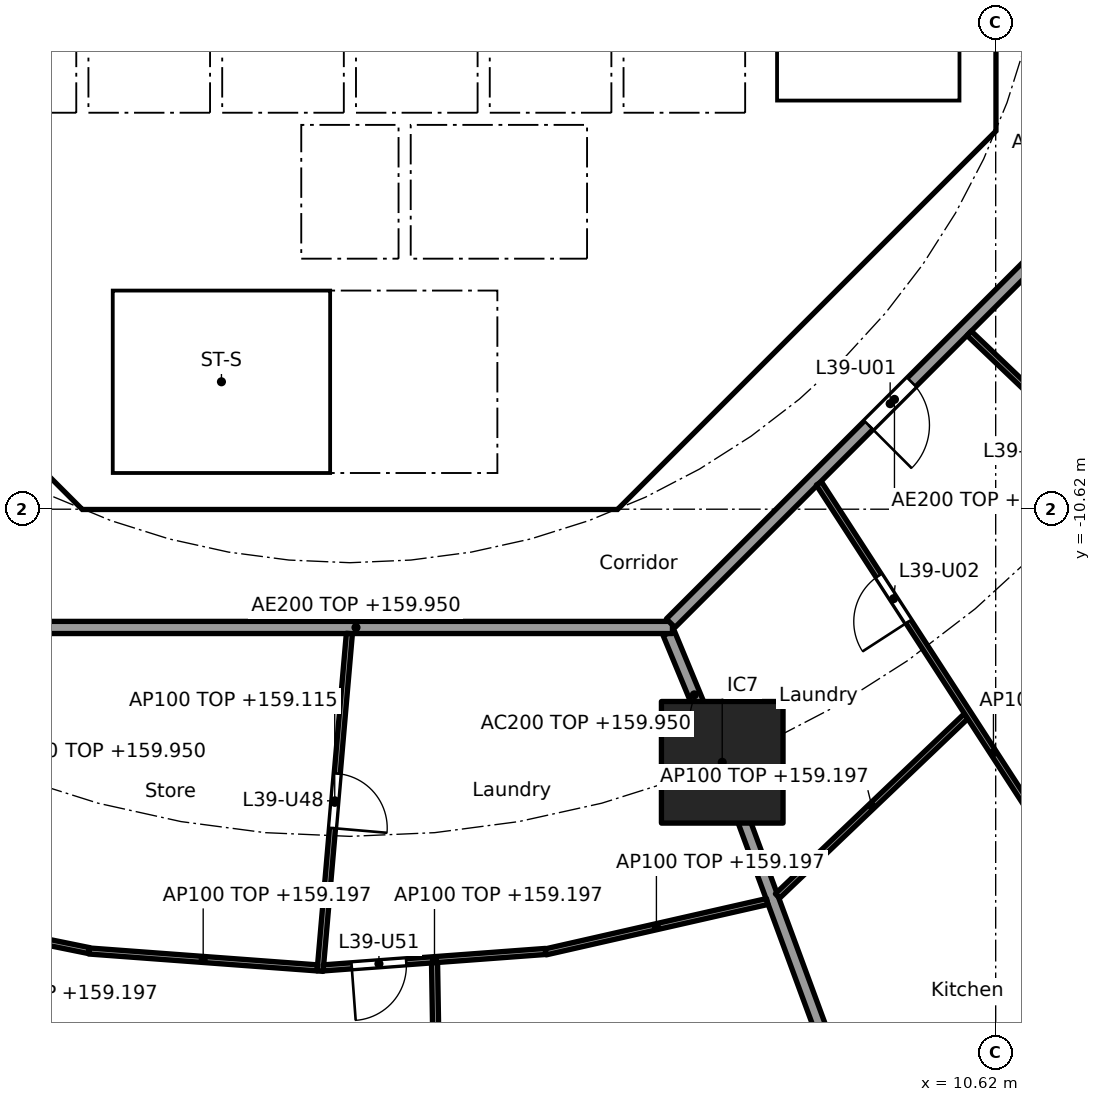
"""IFC4 building model, lengths in metres.
Left out: names, types, materials, properties, quantities, classifications, styles, units other than length and angle.
Written with IfcOpenShell. Run it as: python <this file> out.ifc"""

import sys

from ifc_helpers import new_model, si_unit, direction, frame, frame_2d, origin, origin_2d, place, context, subcontext, project, spatial, polyline, rectangle, outline, extrude, element, fill, save


model = new_model("IFC4")
c1 = context("Model", 3, precision=1e-05, world=origin(), true_north=direction((0.0, 1.0)))
c2 = subcontext(c1, "Body", "Model", "MODEL_VIEW")
j1 = project(units=[si_unit("LENGTHUNIT", "METRE"), si_unit("PLANEANGLEUNIT", "RADIAN")], contexts=[c1])
p1 = place(None, origin())
s1 = spatial("IfcSite", under=j1, at=p1, CompositionType="ELEMENT")
p2 = place(p1, origin())
s2 = spatial("IfcBuilding", under=s1, at=p2, CompositionType="ELEMENT")
p3 = place(p2, frame((0.0, 0.0, 156.6)))
s3 = spatial("IfcBuildingStorey", under=s2, at=p3, CompositionType="ELEMENT", Elevation=156.6)
p4 = place(p3, frame((6.123, -14.782, 0.0), z_axis=(0.0, 0.0, 1.0), x_axis=(1.0, 0.0, 0.0)))
e1 = element("IfcColumn", 1, at=p4, inside=s3, PredefinedType="COLUMN", context=c2, shape_type="SweptSolid", body=[
    extrude(rectangle(XDim=2.0, YDim=2.0, at=origin_2d()), origin(), (0.0, 0.0, 1.0), 3.7),
])
p5 = place(p3, frame((-9.988, -4.613, 0.0), z_axis=(0.0, 0.0, 1.0), x_axis=(0.707106781187, -0.707106781187, 0.0)))
e2 = element("IfcWall", 2, at=p5, inside=s3, PredefinedType="SHEAR", context=c2, shape_type="SweptSolid", body=[
    extrude(rectangle(XDim=7.602, YDim=0.6, at=frame_2d((3.801, 0.0))), origin(), (0.0, 0.0, 1.0), 3.35),
])
p6 = place(p5, frame((6.151, 0.0, 0.0)))
e3 = element("IfcOpeningElement", 3, at=p6, cuts=e2, PredefinedType="OPENING", context=c2, shape_type="SweptSolid", body=[
    extrude(rectangle(XDim=1.1, YDim=2.1, at=frame_2d((0.55, 1.05))), frame((0.0, 0.31, 0.0), z_axis=(0.0, -1.0, 0.0), x_axis=(1.0, 0.0, 0.0)), (0.0, 0.0, 1.0), 0.62),
])
p7 = place(p3, frame((4.613, -9.988, 0.0), z_axis=(0.0, 0.0, 1.0), x_axis=(0.707106781187, 0.707106781187, 0.0)))
e4 = element("IfcWall", 4, at=p7, inside=s3, PredefinedType="SHEAR", context=c2, shape_type="SweptSolid", body=[
    extrude(rectangle(XDim=7.602, YDim=0.6, at=frame_2d((3.801, 0.0))), origin(), (0.0, 0.0, 1.0), 3.35),
])
p8 = place(p7, frame((3.201, 0.0, 0.0)))
e5 = element("IfcOpeningElement", 5, at=p8, cuts=e4, PredefinedType="OPENING", context=c2, shape_type="SweptSolid", body=[
    extrude(rectangle(XDim=1.2, YDim=2.1, at=frame_2d((0.6, 1.05))), frame((0.0, 0.31, 0.0), z_axis=(0.0, -1.0, 0.0), x_axis=(1.0, 0.0, 0.0)), (0.0, 0.0, 1.0), 0.62),
])
p9 = place(p3, frame((4.0, -10.025, 0.0), z_axis=(0.0, 0.0, 1.0), x_axis=(0.0, 1.0, 0.0)))
e6 = element("IfcWall", 6, at=p9, inside=s3, PredefinedType="SOLIDWALL", context=c2, shape_type="SweptSolid", body=[
    extrude(rectangle(XDim=3.0, YDim=0.2, at=frame_2d((1.5, 0.0))), origin(), (0.0, 0.0, 1.0), 3.35),
])
p10 = place(p9, frame((0.975, 0.0, 0.0)))
e7 = element("IfcOpeningElement", 7, at=p10, cuts=e6, PredefinedType="OPENING", context=c2, shape_type="SweptSolid", body=[
    extrude(rectangle(XDim=1.1, YDim=2.1, at=frame_2d((0.55, 1.05))), frame((0.0, 0.11, 0.0), z_axis=(0.0, -1.0, 0.0), x_axis=(1.0, 0.0, 0.0)), (0.0, 0.0, 1.0), 0.22),
])
p11 = place(p3, frame((4.0, -6.5, 0.0), z_axis=(0.0, 0.0, 1.0), x_axis=(0.0, 1.0, 0.0)))
e8 = element("IfcWall", 8, at=p11, inside=s3, PredefinedType="SOLIDWALL", context=c2, shape_type="SweptSolid", body=[
    extrude(rectangle(XDim=2.2, YDim=0.2, at=frame_2d((1.1, 0.0))), origin(), (0.0, 0.0, 1.0), 3.35),
])
p12 = place(p11, frame((0.55, 0.0, 0.0)))
e9 = element("IfcOpeningElement", 9, at=p12, cuts=e8, PredefinedType="OPENING", context=c2, shape_type="SweptSolid", body=[
    extrude(rectangle(XDim=1.1, YDim=2.1, at=frame_2d((0.55, 1.05))), frame((0.0, 0.11, 0.0), z_axis=(0.0, -1.0, 0.0), x_axis=(1.0, 0.0, 0.0)), (0.0, 0.0, 1.0), 0.22),
])
p13 = place(p3, frame((-4.0, -6.5, 0.0), z_axis=(0.0, 0.0, 1.0), x_axis=(0.0, 1.0, 0.0)))
e10 = element("IfcWall", 10, at=p13, inside=s3, PredefinedType="SOLIDWALL", context=c2, shape_type="SweptSolid", body=[
    extrude(rectangle(XDim=2.2, YDim=0.2, at=frame_2d((1.1, 0.0))), origin(), (0.0, 0.0, 1.0), 3.35),
])
p14 = place(p13, frame((0.65, 0.0, 0.0)))
e11 = element("IfcOpeningElement", 11, at=p14, cuts=e10, PredefinedType="OPENING", context=c2, shape_type="SweptSolid", body=[
    extrude(rectangle(XDim=0.9, YDim=2.1, at=frame_2d((0.45, 1.05))), frame((0.0, 0.11, 0.0), z_axis=(0.0, -1.0, 0.0), x_axis=(1.0, 0.0, 0.0)), (0.0, 0.0, 1.0), 0.22),
])
p15 = place(p3, origin())
e12 = element("IfcWall", 12, at=p15, inside=s3, PredefinedType="SHEAR", context=c2, shape_type="SweptSolid", body=[
    extrude(outline(polyline([(-4.152, -10.025), (4.152, -10.025), (4.401, -9.776), (4.825, -10.2), (4.401, -10.625), (-4.401, -10.625), (-4.825, -10.2), (-4.401, -9.776), (-4.152, -10.025)])), origin(), (0.0, 0.0, 1.0), 3.35),
])
p16 = place(p3, origin())
e13 = element("IfcWall", 13, at=p16, inside=s3, PredefinedType="SHEAR", context=c2, shape_type="SweptSolid", body=[
    extrude(outline(polyline([(9.776, -4.401), (10.025, -4.152), (10.025, -3.801), (10.025, 4.152), (9.776, 4.401), (10.2, 4.825), (10.625, 4.401), (10.625, -4.401), (10.2, -4.825), (9.776, -4.401)])), origin(), (0.0, 0.0, 1.0), 3.35),
])
for number, where, z_axis, x_axis in (
    (14, (-0.9, -6.5, 0.0), (0.0, 0.0, 1.0), (0.0, 1.0, 0.0)),
    (15, (0.9, -6.5, 0.0), (0.0, 0.0, 1.0), (0.0, 1.0, 0.0)),
):
    element("IfcWall", number, at=place(p3, frame(where, z_axis=z_axis, x_axis=x_axis)), inside=s3, PredefinedType="SOLIDWALL", context=c2, shape_type="SweptSolid", body=[
        extrude(rectangle(XDim=2.2, YDim=0.2, at=frame_2d((1.1, 0.0))), origin(), (0.0, 0.0, 1.0), 3.35),
    ])
p17 = place(p3, origin())
e16 = element("IfcWall", 16, at=p17, inside=s3, PredefinedType="SOLIDWALL", context=c2, shape_type="SweptSolid", body=[
    extrude(outline(polyline([(-6.7, -2.1), (-6.5, -2.1), (-6.5, -4.1), (-4.5, -4.1), (-4.5, -2.1), (-4.3, -2.1), (-4.3, -4.1), (-2.3, -4.1), (-2.3, -2.1), (-2.1, -2.1), (-2.1, -4.1), (-0.1, -4.1), (-0.1, -2.1), (0.1, -2.1), (0.1, -4.1), (2.1, -4.1), (2.1, -2.1), (2.3, -2.1), (2.3, -4.1), (4.3, -4.1), (4.3, -2.1), (4.5, -2.1), (4.5, -4.1), (6.5, -4.1), (6.5, -2.1), (6.7, -2.1), (6.7, -4.3), (-6.7, -4.3), (-6.7, -2.1)])), origin(), (0.0, 0.0, 1.0), 3.35),
])
p18 = place(p3, origin())
e17 = element("IfcWall", 17, at=p18, inside=s3, PredefinedType="SOLIDWALL", context=c2, shape_type="SweptSolid", body=[
    extrude(outline(polyline([(-3.9, -10.025), (-4.1, -10.025), (-4.1, -7.025), (-3.9, -7.025), (-3.9, -10.025)])), origin(), (0.0, 0.0, 1.0), 3.35),
])
p19 = place(p3, origin())
e18 = element("IfcWall", 18, at=p19, inside=s3, PredefinedType="SOLIDWALL", context=c2, shape_type="SweptSolid", body=[
    extrude(outline(polyline([(4.1, -7.025), (-4.1, -7.025), (-4.1, -6.5), (4.1, -6.5), (4.1, -7.025)])), origin(), (0.0, 0.0, 1.0), 3.35),
])
p20 = place(p3, origin())
e19 = element("IfcWall", 19, at=p20, inside=s3, PredefinedType="SOLIDWALL", context=c2, shape_type="SweptSolid", body=[
    extrude(outline(polyline([(7.025, -3.9), (6.7, -3.9), (6.7, 3.9), (7.025, 3.9), (7.025, -3.9)])), origin(), (0.0, 0.0, 1.0), 3.35),
])
p21 = place(p3, origin())
e20 = element("IfcWall", 20, at=p21, inside=s3, PredefinedType="SOLIDWALL", context=c2, shape_type="SweptSolid", body=[
    extrude(outline(polyline([(10.025, -4.1), (6.7, -4.1), (6.7, -3.9), (10.025, -3.9), (10.025, -4.1)])), origin(), (0.0, 0.0, 1.0), 3.35),
])
p22 = place(p3, frame((5.243, -12.657, 0.0), z_axis=(0.0, 0.0, 1.0), x_axis=(0.38273085373, -0.923859888513, 0.0)))
e21 = element("IfcWall", 21, at=p22, inside=s3, PredefinedType="PARTITIONING", context=c2, shape_type="SweptSolid", body=[
    extrude(rectangle(XDim=2.199, YDim=0.2, at=frame_2d((1.1, 0.0))), origin(), (0.0, 0.0, 1.0), 3.35),
])
p23 = place(p3, frame((6.14, -14.829, 0.0), z_axis=(0.0, 0.0, 1.0), x_axis=(0.346169582481, -0.938171956608, 0.0)))
e22 = element("IfcWall", 22, at=p23, inside=s3, PredefinedType="PARTITIONING", context=c2, shape_type="SweptSolid", body=[
    extrude(rectangle(XDim=14.354, YDim=0.2, at=frame_2d((7.177, 0.0))), origin(), (0.0, 0.0, 1.0), 2.597),
])
p24 = place(p3, frame((-5.104, -12.565, 0.0), z_axis=(0.0, 0.0, 1.0), x_axis=(1.0, 0.0, 0.0)))
e23 = element("IfcWall", 23, at=p24, inside=s3, PredefinedType="PARTITIONING", context=c2, shape_type="SweptSolid", body=[
    extrude(rectangle(XDim=10.409, YDim=0.2, at=frame_2d((5.205, 0.0))), origin(), (0.0, 0.0, 1.0), 3.35),
])
p25 = place(p3, frame((5.275, -12.494, 0.0), z_axis=(0.0, 0.0, 1.0), x_axis=(0.707106781187, 0.707106781187, 0.0)))
e24 = element("IfcWall", 24, at=p25, inside=s3, PredefinedType="PARTITIONING", context=c2, shape_type="SweptSolid", body=[
    extrude(rectangle(XDim=10.409, YDim=0.2, at=frame_2d((5.205, 0.0))), origin(), (0.0, 0.0, 1.0), 3.35),
])
p26 = place(p25, frame((4.604, 0.0, 0.0)))
e25 = element("IfcOpeningElement", 25, at=p26, cuts=e24, PredefinedType="OPENING", context=c2, shape_type="SweptSolid", body=[
    extrude(rectangle(XDim=1.0, YDim=2.1, at=frame_2d((0.5, 1.05))), frame((0.0, 0.11, 0.0), z_axis=(0.0, -1.0, 0.0), x_axis=(1.0, 0.0, 0.0)), (0.0, 0.0, 1.0), 0.22),
])
p27 = place(p3, frame((-7.568, -17.212, 0.0), z_axis=(0.0, 0.0, 1.0), x_axis=(0.979967079473, -0.199159541946, 0.0)))
e26 = element("IfcWall", 26, at=p27, inside=s3, PredefinedType="PARTITIONING", context=c2, shape_type="SweptSolid", body=[
    extrude(rectangle(XDim=3.347, YDim=0.1, at=frame_2d((1.673, 0.0))), origin(), (0.0, 0.0, 1.0), 2.597),
])
p28 = place(p3, frame((-4.29, -17.885, 0.0), z_axis=(0.0, 0.0, 1.0), x_axis=(0.997272353708, -0.073809569363, 0.0)))
e27 = element("IfcWall", 27, at=p28, inside=s3, PredefinedType="PARTITIONING", context=c2, shape_type="SweptSolid", body=[
    extrude(rectangle(XDim=3.764, YDim=0.1, at=frame_2d((1.882, 0.0))), origin(), (0.0, 0.0, 1.0), 2.597),
])
p29 = place(p3, frame((-0.009, -12.664, 0.0), z_axis=(0.0, 0.0, 1.0), x_axis=(-0.086431127211, -0.9962578282, 0.0)))
e28 = element("IfcWall", 28, at=p29, inside=s3, PredefinedType="PARTITIONING", context=c2, shape_type="SweptSolid", body=[
    extrude(rectangle(XDim=5.573, YDim=0.1, at=frame_2d((2.787, 0.0))), origin(), (0.0, 0.0, 1.0), 2.515),
])
p30 = place(p29, frame((2.312, 0.0, 0.0)))
e29 = element("IfcOpeningElement", 29, at=p30, cuts=e28, PredefinedType="OPENING", context=c2, shape_type="SweptSolid", body=[
    extrude(rectangle(XDim=0.9, YDim=2.1, at=frame_2d((0.45, 1.05))), frame((0.0, 0.06, 0.0), z_axis=(0.0, -1.0, 0.0), x_axis=(1.0, 0.0, 0.0)), (0.0, 0.0, 1.0), 0.12),
])
p31 = place(p3, frame((-0.436, -18.163, 0.0), z_axis=(0.0, 0.0, 1.0), x_axis=(0.997271025958, 0.073827506966, 0.0)))
e30 = element("IfcWall", 30, at=p31, inside=s3, PredefinedType="PARTITIONING", context=c2, shape_type="SweptSolid", body=[
    extrude(rectangle(XDim=3.664, YDim=0.1, at=frame_2d((1.832, 0.0))), origin(), (0.0, 0.0, 1.0), 2.597),
])
p32 = place(p31, frame((0.466, 0.0, 0.0)))
e31 = element("IfcOpeningElement", 31, at=p32, cuts=e30, PredefinedType="OPENING", context=c2, shape_type="SweptSolid", body=[
    extrude(rectangle(XDim=0.9, YDim=2.1, at=frame_2d((0.45, 1.05))), frame((0.0, 0.06, 0.0), z_axis=(0.0, -1.0, 0.0), x_axis=(1.0, 0.0, 0.0)), (0.0, 0.0, 1.0), 0.12),
])
p33 = place(p3, frame((1.392, -18.078, 0.0), z_axis=(0.0, 0.0, 1.0), x_axis=(0.016433071124, -0.99986496797, 0.0)))
e32 = element("IfcWall", 32, at=p33, inside=s3, PredefinedType="PARTITIONING", context=c2, shape_type="SweptSolid", body=[
    extrude(rectangle(XDim=6.983, YDim=0.1, at=frame_2d((3.491, 0.0))), origin(), (0.0, 0.0, 1.0), 3.35),
])
p34 = place(p33, frame((3.041, 0.0, 0.0)))
e33 = element("IfcOpeningElement", 33, at=p34, cuts=e32, PredefinedType="OPENING", context=c2, shape_type="SweptSolid", body=[
    extrude(rectangle(XDim=0.9, YDim=2.1, at=frame_2d((0.45, 1.05))), frame((0.0, 0.06, 0.0), z_axis=(0.0, -1.0, 0.0), x_axis=(1.0, 0.0, 0.0)), (0.0, 0.0, 1.0), 0.12),
])
p35 = place(p3, frame((3.219, -17.9, 0.0), z_axis=(0.0, 0.0, 1.0), x_axis=(0.975106528652, 0.22173691118, 0.0)))
e34 = element("IfcWall", 34, at=p35, inside=s3, PredefinedType="PARTITIONING", context=c2, shape_type="SweptSolid", body=[
    extrude(rectangle(XDim=3.736, YDim=0.1, at=frame_2d((1.868, 0.0))), origin(), (0.0, 0.0, 1.0), 2.597),
])
p36 = place(p3, frame((7.032, -16.98, 0.0), z_axis=(0.0, 0.0, 1.0), x_axis=(0.723709759148, 0.690104473622, 0.0)))
e35 = element("IfcWall", 35, at=p36, inside=s3, PredefinedType="PARTITIONING", context=c2, shape_type="SweptSolid", body=[
    extrude(rectangle(XDim=4.286, YDim=0.1, at=frame_2d((2.143, 0.0))), origin(), (0.0, 0.0, 1.0), 2.597),
])
p37 = place(p3, frame((9.195, -22.84, 0.0), z_axis=(0.0, 0.0, 1.0), x_axis=(0.741675855479, 0.670758470241, 0.0)))
e36 = element("IfcWall", 36, at=p37, inside=s3, PredefinedType="PARTITIONING", context=c2, shape_type="SweptSolid", body=[
    extrude(rectangle(XDim=5.656, YDim=0.1, at=frame_2d((2.828, 0.0))), origin(), (0.0, 0.0, 1.0), 2.597),
])
p38 = place(p3, frame((7.712, -10.195, 0.0), z_axis=(0.0, 0.0, 1.0), x_axis=(0.543868615753, -0.839170381269, 0.0)))
e37 = element("IfcWall", 37, at=p38, inside=s3, PredefinedType="PARTITIONING", context=c2, shape_type="SweptSolid", body=[
    extrude(rectangle(XDim=10.558, YDim=0.1, at=frame_2d((5.279, 0.0))), origin(), (0.0, 0.0, 1.0), 2.515),
])
p39 = place(p38, frame((1.81, 0.0, 0.0)))
e38 = element("IfcOpeningElement", 38, at=p39, cuts=e37, PredefinedType="OPENING", context=c2, shape_type="SweptSolid", body=[
    extrude(rectangle(XDim=0.9, YDim=2.1, at=frame_2d((0.45, 1.05))), frame((0.0, 0.06, 0.0), z_axis=(0.0, -1.0, 0.0), x_axis=(1.0, 0.0, 0.0)), (0.0, 0.0, 1.0), 0.12),
])
p40 = place(p38, frame((7.064, 0.0, 0.0)))
e39 = element("IfcOpeningElement", 39, at=p40, cuts=e37, PredefinedType="OPENING", context=c2, shape_type="SweptSolid", body=[
    extrude(rectangle(XDim=0.9, YDim=2.1, at=frame_2d((0.45, 1.05))), frame((0.0, 0.06, 0.0), z_axis=(0.0, -1.0, 0.0), x_axis=(1.0, 0.0, 0.0)), (0.0, 0.0, 1.0), 0.12),
])
p41 = place(p3, frame((10.184, -7.727, 0.0), z_axis=(0.0, 0.0, 1.0), x_axis=(0.723635100101, -0.690182759783, 0.0)))
e40 = element("IfcWall", 40, at=p41, inside=s3, PredefinedType="PARTITIONING", context=c2, shape_type="SweptSolid", body=[
    extrude(rectangle(XDim=14.173, YDim=0.1, at=frame_2d((7.086, 0.0))), origin(), (0.0, 0.0, 1.0), 2.515),
])
p42 = place(p41, frame((1.565, 0.0, 0.0)))
e41 = element("IfcOpeningElement", 41, at=p42, cuts=e40, PredefinedType="OPENING", context=c2, shape_type="SweptSolid", body=[
    extrude(rectangle(XDim=0.9, YDim=2.1, at=frame_2d((0.45, 1.05))), frame((0.0, 0.06, 0.0), z_axis=(0.0, -1.0, 0.0), x_axis=(1.0, 0.0, 0.0)), (0.0, 0.0, 1.0), 0.12),
])
p43 = place(p41, frame((6.257, 0.0, 0.0)))
e42 = element("IfcOpeningElement", 42, at=p43, cuts=e40, PredefinedType="OPENING", context=c2, shape_type="SweptSolid", body=[
    extrude(rectangle(XDim=0.9, YDim=2.1, at=frame_2d((0.45, 1.05))), frame((0.0, 0.06, 0.0), z_axis=(0.0, -1.0, 0.0), x_axis=(1.0, 0.0, 0.0)), (0.0, 0.0, 1.0), 0.12),
])
p44 = place(p41, frame((11.328, 0.0, 0.0)))
e43 = element("IfcOpeningElement", 43, at=p44, cuts=e40, PredefinedType="OPENING", context=c2, shape_type="SweptSolid", body=[
    extrude(rectangle(XDim=0.9, YDim=2.1, at=frame_2d((0.45, 1.05))), frame((0.0, 0.06, 0.0), z_axis=(0.0, -1.0, 0.0), x_axis=(1.0, 0.0, 0.0)), (0.0, 0.0, 1.0), 0.12),
])
p45 = place(p12, origin())
e44 = element("IfcDoor", 44, at=p45, inside=s3, OperationType="DOUBLE_DOOR_SLIDING", PredefinedType="DOOR", context=c2, shape_type="SweptSolid", body=[
    extrude(rectangle(XDim=1.1, YDim=2.1, at=frame_2d((0.55, 1.05))), frame((0.0, 0.025, 0.0), z_axis=(0.0, -1.0, 0.0), x_axis=(1.0, 0.0, 0.0)), (0.0, 0.0, 1.0), 0.05),
])
fill(e9, e44)
p46 = place(p10, origin())
e45 = element("IfcDoor", 45, at=p46, inside=s3, OperationType="SINGLE_SWING_LEFT", PredefinedType="DOOR", context=c2, shape_type="SweptSolid", body=[
    extrude(rectangle(XDim=1.1, YDim=2.1, at=frame_2d((0.55, 1.05))), frame((0.0, 0.025, 0.0), z_axis=(0.0, -1.0, 0.0), x_axis=(1.0, 0.0, 0.0)), (0.0, 0.0, 1.0), 0.05),
])
fill(e7, e45)
p47 = place(p14, frame((0.9, 0.0, 0.0), x_axis=(-1.0, 0.0, 0.0)))
e46 = element("IfcDoor", 46, at=p47, inside=s3, OperationType="SINGLE_SWING_RIGHT", PredefinedType="DOOR", context=c2, shape_type="SweptSolid", body=[
    extrude(rectangle(XDim=0.9, YDim=2.1, at=frame_2d((0.45, 1.05))), frame((0.0, 0.025, 0.0), z_axis=(0.0, -1.0, 0.0), x_axis=(1.0, 0.0, 0.0)), (0.0, 0.0, 1.0), 0.05),
])
fill(e11, e46)
p48 = place(p8, origin())
e47 = element("IfcDoor", 47, at=p48, inside=s3, OperationType="SINGLE_SWING_LEFT", PredefinedType="DOOR", context=c2, shape_type="SweptSolid", body=[
    extrude(rectangle(XDim=1.2, YDim=2.1, at=frame_2d((0.6, 1.05))), frame((0.0, 0.025, 0.0), z_axis=(0.0, -1.0, 0.0), x_axis=(1.0, 0.0, 0.0)), (0.0, 0.0, 1.0), 0.05),
])
fill(e5, e47)
p49 = place(p6, origin())
e48 = element("IfcDoor", 48, at=p49, inside=s3, OperationType="SINGLE_SWING_LEFT", PredefinedType="DOOR", context=c2, shape_type="SweptSolid", body=[
    extrude(rectangle(XDim=1.1, YDim=2.1, at=frame_2d((0.55, 1.05))), frame((0.0, 0.025, 0.0), z_axis=(0.0, -1.0, 0.0), x_axis=(1.0, 0.0, 0.0)), (0.0, 0.0, 1.0), 0.05),
])
fill(e3, e48)
p50 = place(p26, frame((1.0, 0.0, 0.0), x_axis=(-1.0, 0.0, 0.0)))
e49 = element("IfcDoor", 49, at=p50, inside=s3, OperationType="SINGLE_SWING_RIGHT", PredefinedType="DOOR", context=c2, shape_type="SweptSolid", body=[
    extrude(rectangle(XDim=1.0, YDim=2.1, at=frame_2d((0.5, 1.05))), frame((0.0, 0.025, 0.0), z_axis=(0.0, -1.0, 0.0), x_axis=(1.0, 0.0, 0.0)), (0.0, 0.0, 1.0), 0.05),
])
fill(e25, e49)
p51 = place(p39, frame((0.9, 0.0, 0.0), x_axis=(-1.0, 0.0, 0.0)))
e50 = element("IfcDoor", 50, at=p51, inside=s3, OperationType="SINGLE_SWING_LEFT", PredefinedType="DOOR", context=c2, shape_type="SweptSolid", body=[
    extrude(rectangle(XDim=0.9, YDim=2.1, at=frame_2d((0.45, 1.05))), frame((0.0, 0.025, 0.0), z_axis=(0.0, -1.0, 0.0), x_axis=(1.0, 0.0, 0.0)), (0.0, 0.0, 1.0), 0.05),
])
fill(e38, e50)
p52 = place(p30, origin())
e51 = element("IfcDoor", 51, at=p52, inside=s3, OperationType="SINGLE_SWING_RIGHT", PredefinedType="DOOR", context=c2, shape_type="SweptSolid", body=[
    extrude(rectangle(XDim=0.9, YDim=2.1, at=frame_2d((0.45, 1.05))), frame((0.0, 0.025, 0.0), z_axis=(0.0, -1.0, 0.0), x_axis=(1.0, 0.0, 0.0)), (0.0, 0.0, 1.0), 0.05),
])
fill(e29, e51)
p53 = place(p32, frame((0.9, 0.0, 0.0), x_axis=(-1.0, 0.0, 0.0)))
e52 = element("IfcDoor", 52, at=p53, inside=s3, OperationType="SINGLE_SWING_RIGHT", PredefinedType="DOOR", context=c2, shape_type="SweptSolid", body=[
    extrude(rectangle(XDim=0.9, YDim=2.1, at=frame_2d((0.45, 1.05))), frame((0.0, 0.025, 0.0), z_axis=(0.0, -1.0, 0.0), x_axis=(1.0, 0.0, 0.0)), (0.0, 0.0, 1.0), 0.05),
])
fill(e31, e52)
save(model, sys.argv[1])
